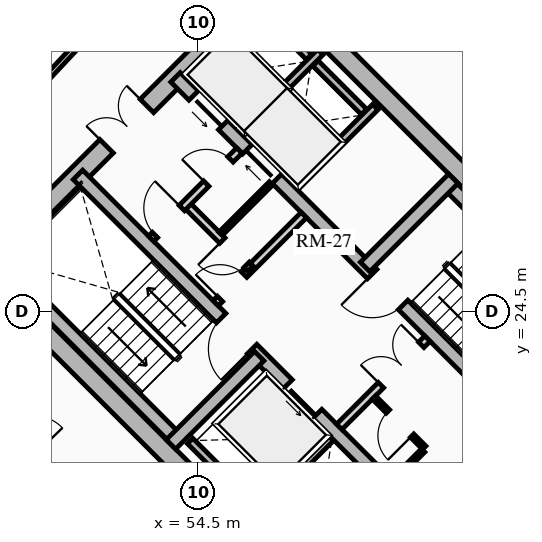
"""IFC4 building model, lengths in metres.
Left out: names, types, materials, properties, quantities, classifications, styles, units other than length and angle.
Written with IfcOpenShell. Run it as: python <this file> out.ifc"""

import sys

from ifc_helpers import new_model, si_unit, direction, frame, frame_2d, origin, place, context, subcontext, project, spatial, rectangle, extrude, source, transform, mapped, element, fill, save


model = new_model("IFC4")
c1 = context("Model", 3, precision=1e-05, world=origin(), true_north=direction((0.0, 1.0)))
c2 = subcontext(c1, "Body", "Model", "MODEL_VIEW")
j1 = project(units=[si_unit("LENGTHUNIT", "METRE"), si_unit("PLANEANGLEUNIT", "RADIAN")], contexts=[c1])
p1 = place(None, origin())
s1 = spatial("IfcSite", under=j1, at=p1, CompositionType="ELEMENT")
p2 = place(p1, origin())
s2 = spatial("IfcBuilding", under=s1, at=p2, CompositionType="ELEMENT")
p3 = place(p2, frame((0.0, 0.0, 33.64)))
s3 = spatial("IfcBuildingStorey", under=s2, at=p3, CompositionType="ELEMENT", Elevation=33.64)
for number, where, z_axis, x_axis in (
    (1, (58.773, 15.661, 0.0), (0.0, 0.0, 1.0), (-0.707, 0.707, 0.0)),
    (2, (66.339, 23.227, 0.0), (0.0, 0.0, 1.0), (-0.707, 0.707, 0.0)),
):
    element("IfcWall", number, at=place(p3, frame(where, z_axis=z_axis, x_axis=x_axis)), inside=s3, PredefinedType="SHEAR", context=c2, shape_type="SweptSolid", body=[
        extrude(rectangle(XDim=14.3, YDim=0.5, at=frame_2d((7.15, 0.0))), origin(), (0.0, 0.0, 1.0), 2.91),
    ])
p4 = place(p3, frame((58.596, 15.838, 0.0), z_axis=(0.0, 0.0, 1.0), x_axis=(0.707106781187, 0.707106781187, 0.0)))
e3 = element("IfcWall", 3, at=p4, inside=s3, PredefinedType="SHEAR", context=c2, shape_type="SweptSolid", body=[
    extrude(rectangle(XDim=10.7, YDim=0.5, at=frame_2d((5.35, 0.0))), origin(), (0.0, 0.0, 1.0), 2.91),
])
m1 = source(origin(), c2, "Body", "SweptSolid", [
    extrude(rectangle(XDim=1.5, YDim=2.02, at=frame_2d((0.75, 1.01))), frame((0.0, 0.26, 0.0), z_axis=(0.0, -1.0, 0.0), x_axis=(1.0, 0.0, 0.0)), (0.0, 0.0, 1.0), 0.52),
])
p5 = place(p4, frame((5.45, 0.0, 0.0)))
e4 = element("IfcOpeningElement", 4, at=p5, cuts=e3, PredefinedType="OPENING", context=c2, shape_type="MappedRepresentation", body=[
    mapped(m1, transform((0.0, 0.0, 0.0), x_axis=(1.0, 0.0, 0.0), y_axis=(0.0, 1.0, 0.0), z_axis=(0.0, 0.0, 1.0), scale=1.0)),
])
p6 = place(p3, frame((48.838, 25.596, 0.0), z_axis=(0.0, 0.0, 1.0), x_axis=(0.707106781187, 0.707106781187, 0.0)))
e5 = element("IfcWall", 5, at=p6, inside=s3, PredefinedType="SHEAR", context=c2, shape_type="SweptSolid", body=[
    extrude(rectangle(XDim=10.7, YDim=0.5, at=frame_2d((5.35, 0.0))), origin(), (0.0, 0.0, 1.0), 2.91),
])
p7 = place(p6, frame((4.6, 0.0, 0.0)))
e6 = element("IfcOpeningElement", 6, at=p7, cuts=e5, PredefinedType="OPENING", context=c2, shape_type="MappedRepresentation", body=[
    mapped(m1, transform((0.0, 0.0, 0.0), x_axis=(1.0, 0.0, 0.0), y_axis=(0.0, 1.0, 0.0), z_axis=(0.0, 0.0, 1.0), scale=1.0)),
])
p8 = place(p3, frame((61.096, 18.338, 0.0), z_axis=(0.0, 0.0, 1.0), x_axis=(-0.707106781187, 0.707106781187, 0.0)))
e7 = element("IfcWall", 7, at=p8, inside=s3, PredefinedType="SHEAR", context=c2, shape_type="SweptSolid", body=[
    extrude(rectangle(XDim=13.8, YDim=0.35, at=frame_2d((6.9, 0.0))), origin(), (0.0, 0.0, 1.0), 2.91),
])
m2 = source(origin(), c2, "Body", "SweptSolid", [
    extrude(rectangle(XDim=1.1, YDim=2.015, at=frame_2d((0.55, 1.007))), frame((0.0, 0.185, 0.0), z_axis=(0.0, -1.0, 0.0), x_axis=(1.0, 0.0, 0.0)), (0.0, 0.0, 1.0), 0.37),
])
p9 = place(p8, frame((4.9, 0.0, 0.0)))
e8 = element("IfcOpeningElement", 8, at=p9, cuts=e7, PredefinedType="OPENING", context=c2, shape_type="MappedRepresentation", body=[
    mapped(m2, transform((0.0, 0.0, 0.0), x_axis=(1.0, 0.0, 0.0), y_axis=(0.0, 1.0, 0.0), z_axis=(0.0, 0.0, 1.0), scale=1.0)),
])
m3 = source(origin(), c2, "Body", "SweptSolid", [
    extrude(rectangle(XDim=1.15, YDim=2.02, at=frame_2d((0.575, 1.01))), frame((0.0, 0.185, 0.0), z_axis=(0.0, -1.0, 0.0), x_axis=(1.0, 0.0, 0.0)), (0.0, 0.0, 1.0), 0.37),
])
p10 = place(p8, frame((7.32, 0.0, 0.0)))
e9 = element("IfcOpeningElement", 9, at=p10, cuts=e7, PredefinedType="OPENING", context=c2, shape_type="MappedRepresentation", body=[
    mapped(m3, transform((0.0, 0.0, 0.0), x_axis=(1.0, 0.0, 0.0), y_axis=(0.0, 1.0, 0.0), z_axis=(0.0, 0.0, 1.0), scale=1.0)),
])
p11 = place(p3, frame((63.662, 20.904, 0.0), z_axis=(0.0, 0.0, 1.0), x_axis=(-0.707106781187, 0.707106781187, 0.0)))
e10 = element("IfcWall", 10, at=p11, inside=s3, PredefinedType="SHEAR", context=c2, shape_type="SweptSolid", body=[
    extrude(rectangle(XDim=13.8, YDim=0.35, at=frame_2d((6.9, 0.0))), origin(), (0.0, 0.0, 1.0), 2.91),
])
p12 = place(p11, frame((10.025, 0.0, 0.0)))
e11 = element("IfcOpeningElement", 11, at=p12, cuts=e10, PredefinedType="OPENING", context=c2, shape_type="MappedRepresentation", body=[
    mapped(m2, transform((0.0, 0.0, 0.0), x_axis=(1.0, 0.0, 0.0), y_axis=(0.0, 1.0, 0.0), z_axis=(0.0, 0.0, 1.0), scale=1.0)),
])
p13 = place(p11, frame((12.025, 0.0, 0.0)))
e12 = element("IfcOpeningElement", 12, at=p13, cuts=e10, PredefinedType="OPENING", context=c2, shape_type="MappedRepresentation", body=[
    mapped(m2, transform((0.0, 0.0, 0.0), x_axis=(1.0, 0.0, 0.0), y_axis=(0.0, 1.0, 0.0), z_axis=(0.0, 0.0, 1.0), scale=1.0)),
])
p14 = place(p11, frame((5.33, 0.0, 0.0)))
e13 = element("IfcOpeningElement", 13, at=p14, cuts=e10, PredefinedType="OPENING", context=c2, shape_type="MappedRepresentation", body=[
    mapped(m3, transform((0.0, 0.0, 0.0), x_axis=(1.0, 0.0, 0.0), y_axis=(0.0, 1.0, 0.0), z_axis=(0.0, 0.0, 1.0), scale=1.0)),
])
p15 = place(p3, frame((53.922, 21.141, 0.0), z_axis=(0.0, 0.0, 1.0), x_axis=(-0.707106781187, 0.707106781187, 0.0)))
e14 = element("IfcWall", 14, at=p15, inside=s3, PredefinedType="SHEAR", context=c2, shape_type="SweptSolid", body=[
    extrude(rectangle(XDim=6.745, YDim=0.35, at=frame_2d((3.373, 0.0))), origin(), (0.0, 0.0, 1.0), 2.91),
])
p16 = place(p3, frame((53.784, 21.003, 0.0), z_axis=(0.0, 0.0, 1.0), x_axis=(0.707106781187, 0.707106781187, 0.0)))
e15 = element("IfcWall", 15, at=p16, inside=s3, PredefinedType="SHEAR", context=c2, shape_type="SweptSolid", body=[
    extrude(rectangle(XDim=3.285, YDim=0.35, at=frame_2d((1.643, 0.0))), origin(), (0.0, 0.0, 1.0), 2.91),
])
p17 = place(p3, frame((65.847, 23.089, 0.0), z_axis=(0.0, 0.0, 1.0), x_axis=(-0.707106781187, 0.707106781187, 0.0)))
e16 = element("IfcWall", 16, at=p17, inside=s3, PredefinedType="SHEAR", context=c2, shape_type="SweptSolid", body=[
    extrude(rectangle(XDim=6.745, YDim=0.35, at=frame_2d((3.373, 0.0))), origin(), (0.0, 0.0, 1.0), 2.91),
])
p18 = place(p3, frame((58.893, 25.674, 0.0), z_axis=(0.0, 0.0, 1.0), x_axis=(0.707106781187, 0.707106781187, 0.0)))
e17 = element("IfcWall", 17, at=p18, inside=s3, PredefinedType="SHEAR", context=c2, shape_type="SweptSolid", body=[
    extrude(rectangle(XDim=3.285, YDim=0.35, at=frame_2d((1.643, 0.0))), origin(), (0.0, 0.0, 1.0), 2.91),
])
p19 = place(p3, frame((55.888, 19.069, 0.0), z_axis=(0.0, 0.0, 1.0), x_axis=(0.707106781187, 0.707106781187, 0.0)))
e18 = element("IfcWall", 18, at=p19, inside=s3, PredefinedType="SHEAR", context=c2, shape_type="SweptSolid", body=[
    extrude(rectangle(XDim=2.97, YDim=0.2, at=frame_2d((1.485, 0.0))), origin(), (0.0, 0.0, 1.0), 2.91),
])
p20 = place(p3, frame((56.015, 19.366, 0.0), z_axis=(0.0, 0.0, 1.0), x_axis=(-0.707106781187, 0.707106781187, 0.0)))
e19 = element("IfcWall", 19, at=p20, inside=s3, PredefinedType="SHEAR", context=c2, shape_type="SweptSolid", body=[
    extrude(rectangle(XDim=2.44, YDim=0.2, at=frame_2d((1.22, 0.0))), origin(), (0.0, 0.0, 1.0), 2.91),
])
p21 = place(p3, frame((57.062, 27.781, 0.0), z_axis=(0.0, 0.0, 1.0), x_axis=(0.707106781187, 0.707106781187, 0.0)))
e20 = element("IfcWall", 20, at=p21, inside=s3, PredefinedType="SHEAR", context=c2, shape_type="SweptSolid", body=[
    extrude(rectangle(XDim=2.97, YDim=0.2, at=frame_2d((1.485, 0.0))), origin(), (0.0, 0.0, 1.0), 2.91),
])
p22 = place(p3, frame((55.615, 29.227, 0.0), z_axis=(0.0, 0.0, 1.0), x_axis=(0.707147878904, 0.70706568108, 0.0)))
e21 = element("IfcWall", 21, at=p22, inside=s3, PredefinedType="SHEAR", context=c2, shape_type="SweptSolid", body=[
    extrude(rectangle(XDim=2.97, YDim=0.2, at=frame_2d((1.485, 0.0))), origin(), (0.0, 0.0, 1.0), 2.91),
])
p23 = place(p3, frame((58.865, 29.754, 0.0), z_axis=(0.0, 0.0, 1.0), x_axis=(-0.707174411312, 0.707039144592, 0.0)))
e22 = element("IfcWall", 22, at=p23, inside=s3, PredefinedType="SHEAR", context=c2, shape_type="SweptSolid", body=[
    extrude(rectangle(XDim=1.805, YDim=0.2, at=frame_2d((0.902, 0.0))), origin(), (0.0, 0.0, 1.0), 2.91),
])
p24 = place(p3, frame((57.419, 31.2, 0.0), z_axis=(0.0, 0.0, 1.0), x_axis=(-0.707032117043, 0.707181437447, 0.0)))
e23 = element("IfcWall", 23, at=p24, inside=s3, PredefinedType="SHEAR", context=c2, shape_type="SweptSolid", body=[
    extrude(rectangle(XDim=1.635, YDim=0.2, at=frame_2d((0.817, 0.0))), origin(), (0.0, 0.0, 1.0), 2.91),
])
p25 = place(p3, frame((58.214, 21.467, 0.0), z_axis=(0.0, 0.0, 1.0), x_axis=(0.707106781187, 0.707106781187, 0.0)))
e24 = element("IfcWall", 24, at=p25, inside=s3, PredefinedType="PARTITIONING", context=c2, shape_type="SweptSolid", body=[
    extrude(rectangle(XDim=3.28, YDim=0.2, at=frame_2d((1.64, 0.0))), origin(), (0.0, 0.0, 1.0), 2.635),
])
m4 = source(origin(), c2, "Body", "SweptSolid", [
    extrude(rectangle(XDim=1.5, YDim=2.02, at=frame_2d((0.75, 1.01))), frame((0.0, 0.11, 0.0), z_axis=(0.0, -1.0, 0.0), x_axis=(1.0, 0.0, 0.0)), (0.0, 0.0, 1.0), 0.22),
])
p26 = place(p25, frame((1.55, 0.0, 0.0)))
e25 = element("IfcOpeningElement", 25, at=p26, cuts=e24, PredefinedType="OPENING", context=c2, shape_type="MappedRepresentation", body=[
    mapped(m4, transform((0.0, 0.0, 0.0), x_axis=(1.0, 0.0, 0.0), y_axis=(0.0, 1.0, 0.0), z_axis=(0.0, 0.0, 1.0), scale=1.0)),
])
p27 = place(p3, frame((54.961, 24.719, 0.0), z_axis=(0.0, 0.0, 1.0), x_axis=(0.707106781187, 0.707106781187, 0.0)))
e26 = element("IfcWall", 26, at=p27, inside=s3, PredefinedType="PARTITIONING", context=c2, shape_type="SweptSolid", body=[
    extrude(rectangle(XDim=3.28, YDim=0.2, at=frame_2d((1.64, 0.0))), origin(), (0.0, 0.0, 1.0), 2.635),
])
m5 = source(origin(), c2, "Body", "SweptSolid", [
    extrude(rectangle(XDim=0.9, YDim=2.005, at=frame_2d((0.45, 1.002))), frame((0.0, 0.11, 0.0), z_axis=(0.0, -1.0, 0.0), x_axis=(1.0, 0.0, 0.0)), (0.0, 0.0, 1.0), 0.22),
])
p28 = place(p27, frame((0.16, 0.0, 0.0)))
e27 = element("IfcOpeningElement", 27, at=p28, cuts=e26, PredefinedType="OPENING", context=c2, shape_type="MappedRepresentation", body=[
    mapped(m5, transform((0.0, 0.0, 0.0), x_axis=(1.0, 0.0, 0.0), y_axis=(0.0, 1.0, 0.0), z_axis=(0.0, 0.0, 1.0), scale=1.0)),
])
p29 = place(p3, frame((55.874, 25.631, 0.0), z_axis=(0.0, 0.0, 1.0), x_axis=(-0.707157639372, 0.707055919343, 0.0)))
e28 = element("IfcWall", 28, at=p29, inside=s3, PredefinedType="PARTITIONING", context=c2, shape_type="SweptSolid", body=[
    extrude(rectangle(XDim=2.4, YDim=0.2, at=frame_2d((1.2, 0.0))), origin(), (0.0, 0.0, 1.0), 2.635),
])
p30 = place(p29, frame((0.14, 0.0, 0.0)))
e29 = element("IfcOpeningElement", 29, at=p30, cuts=e28, PredefinedType="OPENING", context=c2, shape_type="MappedRepresentation", body=[
    mapped(m5, transform((0.0, 0.0, 0.0), x_axis=(1.0, 0.0, 0.0), y_axis=(0.0, 1.0, 0.0), z_axis=(0.0, 0.0, 1.0), scale=1.0)),
])
p31 = place(p3, frame((53.264, 26.416, 0.0), z_axis=(0.0, 0.0, 1.0), x_axis=(0.707106781187, 0.707106781187, 0.0)))
e30 = element("IfcWall", 30, at=p31, inside=s3, PredefinedType="PARTITIONING", context=c2, shape_type="SweptSolid", body=[
    extrude(rectangle(XDim=3.28, YDim=0.2, at=frame_2d((1.64, 0.0))), origin(), (0.0, 0.0, 1.0), 2.635),
])
m6 = source(origin(), c2, "Body", "SweptSolid", [
    extrude(rectangle(XDim=1.0, YDim=2.015, at=frame_2d((0.5, 1.007))), frame((0.0, 0.11, 0.0), z_axis=(0.0, -1.0, 0.0), x_axis=(1.0, 0.0, 0.0)), (0.0, 0.0, 1.0), 0.22),
])
p32 = place(p31, frame((0.14, 0.0, 0.0)))
e31 = element("IfcOpeningElement", 31, at=p32, cuts=e30, PredefinedType="OPENING", context=c2, shape_type="MappedRepresentation", body=[
    mapped(m6, transform((0.0, 0.0, 0.0), x_axis=(1.0, 0.0, 0.0), y_axis=(0.0, 1.0, 0.0), z_axis=(0.0, 0.0, 1.0), scale=1.0)),
])
p33 = place(p31, frame((2.05, 0.0, 0.0)))
e32 = element("IfcOpeningElement", 32, at=p33, cuts=e30, PredefinedType="OPENING", context=c2, shape_type="MappedRepresentation", body=[
    mapped(m5, transform((0.0, 0.0, 0.0), x_axis=(1.0, 0.0, 0.0), y_axis=(0.0, 1.0, 0.0), z_axis=(0.0, 0.0, 1.0), scale=1.0)),
])
p34 = place(p3, frame((60.448, 20.915, 0.0), z_axis=(0.0, 0.0, 1.0), x_axis=(-0.707106781187, 0.707106781187, 0.0)))
e33 = element("IfcWall", 33, at=p34, inside=s3, PredefinedType="PARTITIONING", context=c2, shape_type="SweptSolid", body=[
    extrude(rectangle(XDim=1.87, YDim=0.125, at=frame_2d((0.935, 0.0))), origin(), (0.0, 0.0, 1.0), 2.635),
])
m7 = source(origin(), c2, "Body", "SweptSolid", [
    extrude(rectangle(XDim=0.9, YDim=2.005, at=frame_2d((0.45, 1.002))), frame((0.0, 0.073, 0.0), z_axis=(0.0, -1.0, 0.0), x_axis=(1.0, 0.0, 0.0)), (0.0, 0.0, 1.0), 0.145),
])
p35 = place(p34, frame((0.45, 0.0, 0.0)))
e34 = element("IfcOpeningElement", 34, at=p35, cuts=e33, PredefinedType="OPENING", context=c2, shape_type="MappedRepresentation", body=[
    mapped(m7, transform((0.0, 0.0, 0.0), x_axis=(1.0, 0.0, 0.0), y_axis=(0.0, 1.0, 0.0), z_axis=(0.0, 0.0, 1.0), scale=1.0)),
])
p36 = place(p3, frame((59.643, 20.066, 0.0), z_axis=(0.0, 0.0, 1.0), x_axis=(0.707106781187, 0.707106781187, 0.0)))
e35 = element("IfcWall", 35, at=p36, inside=s3, PredefinedType="PARTITIONING", context=c2, shape_type="SweptSolid", body=[
    extrude(rectangle(XDim=1.1, YDim=0.125, at=frame_2d((0.55, 0.0))), origin(), (0.0, 0.0, 1.0), 2.635),
])
p37 = place(p3, frame((55.089, 26.543, 0.0), z_axis=(0.0, 0.0, 1.0), x_axis=(0.707106781187, 0.707106781187, 0.0)))
e36 = element("IfcWall", 36, at=p37, inside=s3, PredefinedType="PARTITIONING", context=c2, shape_type="SweptSolid", body=[
    extrude(rectangle(XDim=1.88, YDim=0.125, at=frame_2d((0.94, 0.0))), origin(), (0.0, 0.0, 1.0), 2.635),
])
p38 = place(p3, frame((63.086, 30.086, 0.0), z_axis=(0.0, 0.0, 1.0), x_axis=(-0.699075897379, 0.715047473741, 0.0)))
e37 = element("IfcWall", 37, at=p38, inside=s3, PredefinedType="PARTITIONING", context=c2, shape_type="SweptSolid", body=[
    extrude(rectangle(XDim=6.114, YDim=0.15, at=frame_2d((3.057, 0.0))), origin(), (0.0, 0.0, 1.0), 2.159),
])
m8 = source(origin(), c2, "Body", "SweptSolid", [
    extrude(rectangle(XDim=1.05, YDim=2.015, at=frame_2d((0.525, 1.007))), frame((0.0, 0.085, 0.0), z_axis=(0.0, -1.0, 0.0), x_axis=(1.0, 0.0, 0.0)), (0.0, 0.0, 1.0), 0.17),
])
p39 = place(p38, frame((2.532, 0.0, 0.0)))
e38 = element("IfcOpeningElement", 38, at=p39, cuts=e37, PredefinedType="OPENING", context=c2, shape_type="MappedRepresentation", body=[
    mapped(m8, transform((0.0, 0.0, 0.0), x_axis=(1.0, 0.0, 0.0), y_axis=(0.0, 1.0, 0.0), z_axis=(0.0, 0.0, 1.0), scale=1.0)),
])
p40 = place(p3, frame((52.043, 32.28, 0.0), z_axis=(0.0, 0.0, 1.0), x_axis=(-0.682606081633, -0.730786519661, 0.0)))
e39 = element("IfcWall", 39, at=p40, inside=s3, PredefinedType="PARTITIONING", context=c2, shape_type="SweptSolid", body=[
    extrude(rectangle(XDim=6.527, YDim=0.15, at=frame_2d((3.263, 0.0))), origin(), (0.0, 0.0, 1.0), 2.159),
])
p41 = place(p3, frame((47.706, 23.253, 0.0), z_axis=(0.0, 0.0, 1.0), x_axis=(0.696179266346, -0.717867974707, 0.0)))
e40 = element("IfcWall", 40, at=p41, inside=s3, PredefinedType="PARTITIONING", context=c2, shape_type="SweptSolid", body=[
    extrude(rectangle(XDim=6.045, YDim=0.15, at=frame_2d((3.022, 0.0))), origin(), (0.0, 0.0, 1.0), 2.635),
])
p42 = place(p41, frame((2.497, 0.0, 0.0)))
e41 = element("IfcOpeningElement", 41, at=p42, cuts=e40, PredefinedType="OPENING", context=c2, shape_type="MappedRepresentation", body=[
    mapped(m8, transform((0.0, 0.0, 0.0), x_axis=(1.0, 0.0, 0.0), y_axis=(0.0, 1.0, 0.0), z_axis=(0.0, 0.0, 1.0), scale=1.0)),
])
m9 = source(origin(), c2, "Body", "SweptSolid", [
    extrude(rectangle(XDim=1.1, YDim=2.015, at=frame_2d((0.55, 1.007))), frame((0.0, 0.025, 0.0), z_axis=(0.0, -1.0, 0.0), x_axis=(1.0, 0.0, 0.0)), (0.0, 0.0, 1.0), 0.05),
])
p43 = place(p9, origin())
e42 = element("IfcDoor", 42, at=p43, inside=s3, OperationType="SLIDING_TO_LEFT", PredefinedType="DOOR", context=c2, shape_type="MappedRepresentation", body=[
    mapped(m9, transform((0.0, 0.0, 0.0), x_axis=(1.0, 0.0, 0.0), y_axis=(0.0, 1.0, 0.0), z_axis=(0.0, 0.0, 1.0), scale=1.0)),
])
fill(e8, e42)
p44 = place(p12, origin())
e43 = element("IfcDoor", 43, at=p44, inside=s3, OperationType="SLIDING_TO_RIGHT", PredefinedType="DOOR", context=c2, shape_type="MappedRepresentation", body=[
    mapped(m9, transform((0.0, 0.0, 0.0), x_axis=(1.0, 0.0, 0.0), y_axis=(0.0, 1.0, 0.0), z_axis=(0.0, 0.0, 1.0), scale=1.0)),
])
fill(e11, e43)
p45 = place(p13, origin())
e44 = element("IfcDoor", 44, at=p45, inside=s3, OperationType="SLIDING_TO_LEFT", PredefinedType="DOOR", context=c2, shape_type="MappedRepresentation", body=[
    mapped(m9, transform((0.0, 0.0, 0.0), x_axis=(1.0, 0.0, 0.0), y_axis=(0.0, 1.0, 0.0), z_axis=(0.0, 0.0, 1.0), scale=1.0)),
])
fill(e12, e44)
m10 = source(origin(), c2, "Body", "SweptSolid", [
    extrude(rectangle(XDim=1.15, YDim=2.02, at=frame_2d((0.575, 1.01))), frame((0.0, 0.025, 0.0), z_axis=(0.0, -1.0, 0.0), x_axis=(1.0, 0.0, 0.0)), (0.0, 0.0, 1.0), 0.05),
])
p46 = place(p10, origin())
e45 = element("IfcDoor", 45, at=p46, inside=s3, OperationType="SINGLE_SWING_LEFT", PredefinedType="DOOR", context=c2, shape_type="MappedRepresentation", body=[
    mapped(m10, transform((0.0, 0.0, 0.0), x_axis=(1.0, 0.0, 0.0), y_axis=(0.0, 1.0, 0.0), z_axis=(0.0, 0.0, 1.0), scale=1.0)),
])
fill(e9, e45)
p47 = place(p14, origin())
e46 = element("IfcDoor", 46, at=p47, inside=s3, OperationType="SINGLE_SWING_RIGHT", PredefinedType="DOOR", context=c2, shape_type="MappedRepresentation", body=[
    mapped(m10, transform((0.0, 0.0, 0.0), x_axis=(1.0, 0.0, 0.0), y_axis=(0.0, 1.0, 0.0), z_axis=(0.0, 0.0, 1.0), scale=1.0)),
])
fill(e13, e46)
m11 = source(origin(), c2, "Body", "SweptSolid", [
    extrude(rectangle(XDim=1.5, YDim=2.02, at=frame_2d((0.75, 1.01))), frame((0.0, 0.025, 0.0), z_axis=(0.0, -1.0, 0.0), x_axis=(1.0, 0.0, 0.0)), (0.0, 0.0, 1.0), 0.05),
])
p48 = place(p7, origin())
e47 = element("IfcDoor", 47, at=p48, inside=s3, OperationType="DOUBLE_DOOR_SINGLE_SWING", PredefinedType="DOOR", context=c2, shape_type="MappedRepresentation", body=[
    mapped(m11, transform((0.0, 0.0, 0.0), x_axis=(1.0, 0.0, 0.0), y_axis=(0.0, 1.0, 0.0), z_axis=(0.0, 0.0, 1.0), scale=1.0)),
])
fill(e6, e47)
p49 = place(p26, origin())
e48 = element("IfcDoor", 48, at=p49, inside=s3, OperationType="DOUBLE_DOOR_SINGLE_SWING", PredefinedType="DOOR", context=c2, shape_type="MappedRepresentation", body=[
    mapped(m11, transform((0.0, 0.0, 0.0), x_axis=(1.0, 0.0, 0.0), y_axis=(0.0, 1.0, 0.0), z_axis=(0.0, 0.0, 1.0), scale=1.0)),
])
fill(e25, e48)
m12 = source(origin(), c2, "Body", "SweptSolid", [
    extrude(rectangle(XDim=0.9, YDim=2.005, at=frame_2d((0.45, 1.002))), frame((0.0, 0.025, 0.0), z_axis=(0.0, -1.0, 0.0), x_axis=(1.0, 0.0, 0.0)), (0.0, 0.0, 1.0), 0.05),
])
p50 = place(p28, origin())
e49 = element("IfcDoor", 49, at=p50, inside=s3, OperationType="SINGLE_SWING_LEFT", PredefinedType="DOOR", context=c2, shape_type="MappedRepresentation", body=[
    mapped(m12, transform((0.0, 0.0, 0.0), x_axis=(1.0, 0.0, 0.0), y_axis=(0.0, 1.0, 0.0), z_axis=(0.0, 0.0, 1.0), scale=1.0)),
])
fill(e27, e49)
m13 = source(origin(), c2, "Body", "SweptSolid", [
    extrude(rectangle(XDim=1.0, YDim=2.015, at=frame_2d((0.5, 1.007))), frame((0.0, 0.025, 0.0), z_axis=(0.0, -1.0, 0.0), x_axis=(1.0, 0.0, 0.0)), (0.0, 0.0, 1.0), 0.05),
])
p51 = place(p32, origin())
e50 = element("IfcDoor", 50, at=p51, inside=s3, OperationType="SINGLE_SWING_RIGHT", PredefinedType="DOOR", context=c2, shape_type="MappedRepresentation", body=[
    mapped(m13, transform((0.0, 0.0, 0.0), x_axis=(1.0, 0.0, 0.0), y_axis=(0.0, 1.0, 0.0), z_axis=(0.0, 0.0, 1.0), scale=1.0)),
])
fill(e31, e50)
p52 = place(p35, origin())
e51 = element("IfcDoor", 51, at=p52, inside=s3, OperationType="SINGLE_SWING_LEFT", PredefinedType="DOOR", context=c2, shape_type="MappedRepresentation", body=[
    mapped(m12, transform((0.0, 0.0, 0.0), x_axis=(1.0, 0.0, 0.0), y_axis=(0.0, 1.0, 0.0), z_axis=(0.0, 0.0, 1.0), scale=1.0)),
])
fill(e34, e51)
p53 = place(p30, origin())
e52 = element("IfcDoor", 52, at=p53, inside=s3, OperationType="SINGLE_SWING_RIGHT", PredefinedType="DOOR", context=c2, shape_type="MappedRepresentation", body=[
    mapped(m12, transform((0.0, 0.0, 0.0), x_axis=(1.0, 0.0, 0.0), y_axis=(0.0, 1.0, 0.0), z_axis=(0.0, 0.0, 1.0), scale=1.0)),
])
fill(e29, e52)
p54 = place(p33, origin())
e53 = element("IfcDoor", 53, at=p54, inside=s3, OperationType="SINGLE_SWING_LEFT", PredefinedType="DOOR", context=c2, shape_type="MappedRepresentation", body=[
    mapped(m12, transform((0.0, 0.0, 0.0), x_axis=(1.0, 0.0, 0.0), y_axis=(0.0, 1.0, 0.0), z_axis=(0.0, 0.0, 1.0), scale=1.0)),
])
fill(e32, e53)
save(model, sys.argv[1])
